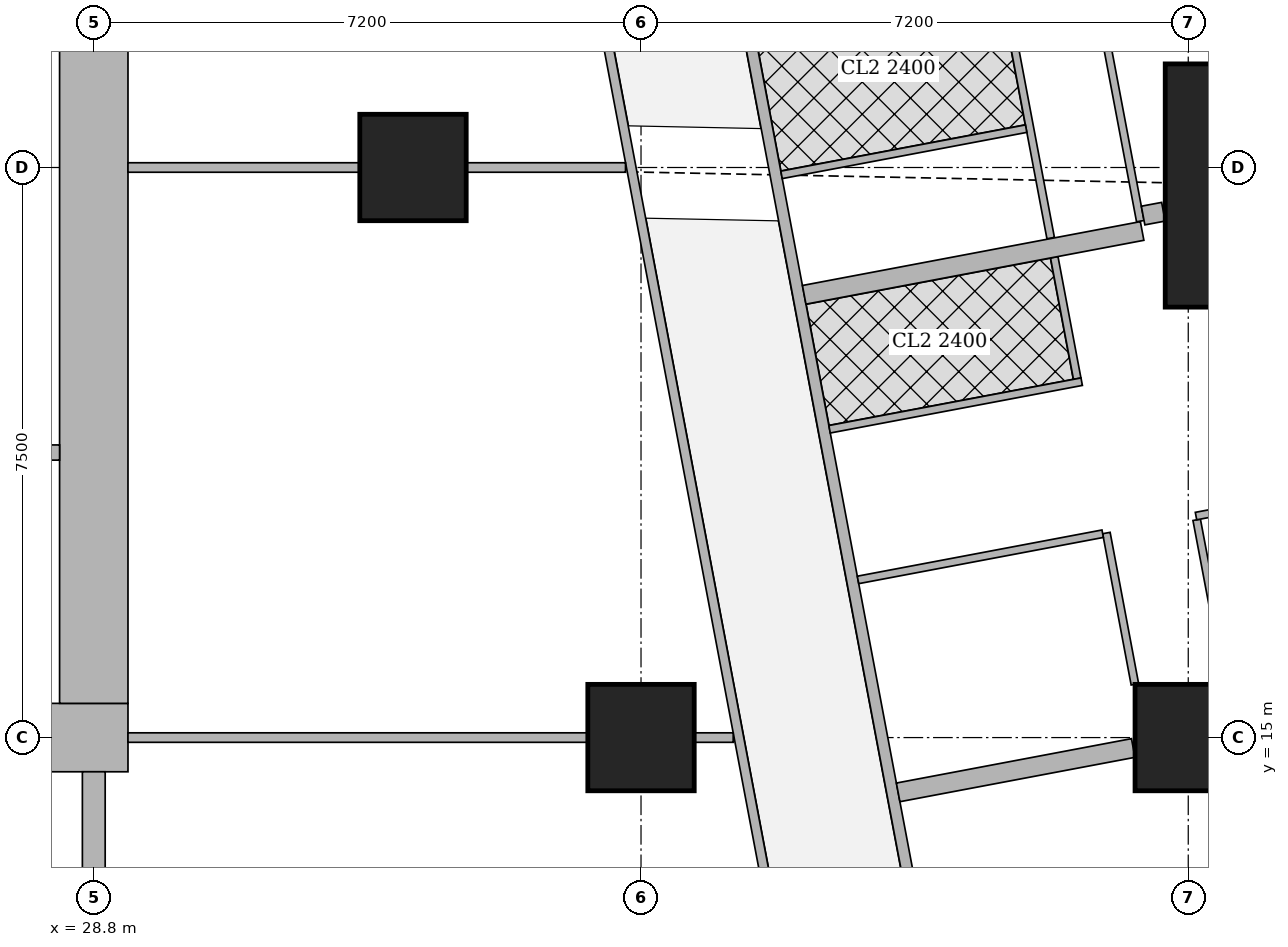
"""IFC4 building model, lengths in metres.
Left out: names, types, materials, properties, quantities, classifications, styles, units other than length and angle.
Written with IfcOpenShell. Run it as: python <this file> out.ifc"""

import sys

from ifc_helpers import new_model, si_unit, direction, frame, frame_2d, origin, origin_2d, place, context, subcontext, project, spatial, rectangle, extrude, element, fill, save


model = new_model("IFC4")
c1 = context("Model", 3, precision=1e-05, world=origin(), true_north=direction((0.0, 1.0)))
c2 = subcontext(c1, "Body", "Model", "MODEL_VIEW")
j1 = project(units=[si_unit("LENGTHUNIT", "METRE"), si_unit("PLANEANGLEUNIT", "RADIAN")], contexts=[c1])
p1 = place(None, origin())
s1 = spatial("IfcSite", under=j1, at=p1, CompositionType="ELEMENT")
p2 = place(p1, origin())
s2 = spatial("IfcBuilding", under=s1, at=p2, CompositionType="ELEMENT")
p3 = place(p2, frame((0.0, 0.0, 216.2)))
s3 = spatial("IfcBuildingStorey", under=s2, at=p3, CompositionType="ELEMENT", Elevation=216.2)
for number, where, z_axis, x_axis in (
    (1, (36.0, 15.0, 0.0), (0.0, 0.0, 1.0), (1.0, 0.0, 0.0)),
    (2, (43.2, 15.0, 0.0), (0.0, 0.0, 1.0), (1.0, 0.0, 0.0)),
    (3, (33.0, 22.5, 0.0), (0.0, 0.0, 1.0), (1.0, 0.0, 0.0)),
):
    element("IfcColumn", number, at=place(p3, frame(where, z_axis=z_axis, x_axis=x_axis)), inside=s3, PredefinedType="COLUMN", context=c2, shape_type="SweptSolid", body=[
        extrude(rectangle(XDim=1.4, YDim=1.4, at=origin_2d()), origin(), (0.0, 0.0, 1.0), 3.75),
    ])
p4 = place(p3, frame((44.697, 22.263, 0.0), z_axis=(0.0, 0.0, 1.0), x_axis=(1.0, 0.0, 0.0)))
e4 = element("IfcColumn", 4, at=p4, inside=s3, PredefinedType="COLUMN", context=c2, shape_type="SweptSolid", body=[
    extrude(rectangle(XDim=3.6, YDim=3.2, at=origin_2d()), origin(), (0.0, 0.0, 1.0), 3.75),
])
p5 = place(p3, frame((13.95, 15.0, 0.0), z_axis=(0.0, 0.0, 1.0), x_axis=(1.0, 0.0, 0.0)))
e5 = element("IfcWall", 5, at=p5, inside=s3, PredefinedType="SHEAR", context=c2, shape_type="SweptSolid", body=[
    extrude(rectangle(XDim=15.3, YDim=0.9, at=frame_2d((7.65, 0.0))), origin(), (0.0, 0.0, 1.0), 3.75),
])
p6 = place(p5, frame((4.45, 0.0, 0.0)))
e6 = element("IfcOpeningElement", 6, at=p6, cuts=e5, PredefinedType="OPENING", context=c2, shape_type="SweptSolid", body=[
    extrude(rectangle(XDim=1.8, YDim=2.1, at=frame_2d((0.9, 1.05))), frame((0.0, 0.46, 0.0), z_axis=(0.0, -1.0, 0.0), x_axis=(1.0, 0.0, 0.0)), (0.0, 0.0, 1.0), 0.92),
])
p7 = place(p5, frame((10.7, 0.0, 0.0)))
e7 = element("IfcOpeningElement", 7, at=p7, cuts=e5, PredefinedType="OPENING", context=c2, shape_type="SweptSolid", body=[
    extrude(rectangle(XDim=1.1, YDim=2.1, at=frame_2d((0.55, 1.05))), frame((0.0, 0.46, 0.0), z_axis=(0.0, -1.0, 0.0), x_axis=(1.0, 0.0, 0.0)), (0.0, 0.0, 1.0), 0.92),
])
p8 = place(p3, frame((28.8, 15.45, 0.0), z_axis=(0.0, 0.0, 1.0), x_axis=(0.0, 1.0, 0.0)))
e8 = element("IfcWall", 8, at=p8, inside=s3, PredefinedType="SHEAR", context=c2, shape_type="SweptSolid", body=[
    extrude(rectangle(XDim=14.1, YDim=0.9, at=frame_2d((7.05, 0.0))), origin(), (0.0, 0.0, 1.0), 3.75),
])
p9 = place(p3, frame((28.8, 10.35, 0.0), z_axis=(0.0, 0.0, 1.0), x_axis=(0.0, 1.0, 0.0)))
e9 = element("IfcWall", 9, at=p9, inside=s3, PredefinedType="SHEAR", context=c2, shape_type="SweptSolid", body=[
    extrude(rectangle(XDim=4.2, YDim=0.3, at=frame_2d((2.1, 0.0))), origin(), (0.0, 0.0, 1.0), 3.75),
])
p10 = place(p3, frame((50.653, 2.703, 0.0), z_axis=(0.0, 0.0, 1.0), x_axis=(-0.185612026696, 0.982623109613, 0.0)))
e10 = element("IfcWall", 10, at=p10, inside=s3, PredefinedType="SOLIDWALL", context=c2, shape_type="SweptSolid", body=[
    extrude(rectangle(XDim=41.393, YDim=0.2, at=frame_2d((20.697, 0.0))), origin(), (0.0, 0.0, 1.0), 3.5),
])
p11 = place(p10, frame((1.633, 0.0, 0.9)))
e11 = element("IfcOpeningElement", 11, at=p11, cuts=e10, PredefinedType="OPENING", context=c2, shape_type="SweptSolid", body=[
    extrude(rectangle(XDim=1.8, YDim=1.5, at=frame_2d((0.9, 0.75))), frame((0.0, 0.11, 0.0), z_axis=(0.0, -1.0, 0.0), x_axis=(1.0, 0.0, 0.0)), (0.0, 0.0, 1.0), 0.22),
])
p12 = place(p10, frame((6.032, 0.0, 0.9)))
e12 = element("IfcOpeningElement", 12, at=p12, cuts=e10, PredefinedType="OPENING", context=c2, shape_type="SweptSolid", body=[
    extrude(rectangle(XDim=1.8, YDim=1.5, at=frame_2d((0.9, 0.75))), frame((0.0, 0.11, 0.0), z_axis=(0.0, -1.0, 0.0), x_axis=(1.0, 0.0, 0.0)), (0.0, 0.0, 1.0), 0.22),
])
p13 = place(p10, frame((9.848, 0.0, 0.9)))
e13 = element("IfcOpeningElement", 13, at=p13, cuts=e10, PredefinedType="OPENING", context=c2, shape_type="SweptSolid", body=[
    extrude(rectangle(XDim=1.8, YDim=1.5, at=frame_2d((0.9, 0.75))), frame((0.0, 0.11, 0.0), z_axis=(0.0, -1.0, 0.0), x_axis=(1.0, 0.0, 0.0)), (0.0, 0.0, 1.0), 0.22),
])
p14 = place(p10, frame((13.664, 0.0, 0.9)))
e14 = element("IfcOpeningElement", 14, at=p14, cuts=e10, PredefinedType="OPENING", context=c2, shape_type="SweptSolid", body=[
    extrude(rectangle(XDim=1.8, YDim=1.5, at=frame_2d((0.9, 0.75))), frame((0.0, 0.11, 0.0), z_axis=(0.0, -1.0, 0.0), x_axis=(1.0, 0.0, 0.0)), (0.0, 0.0, 1.0), 0.22),
])
p15 = place(p10, frame((17.481, 0.0, 0.9)))
e15 = element("IfcOpeningElement", 15, at=p15, cuts=e10, PredefinedType="OPENING", context=c2, shape_type="SweptSolid", body=[
    extrude(rectangle(XDim=1.8, YDim=1.5, at=frame_2d((0.9, 0.75))), frame((0.0, 0.11, 0.0), z_axis=(0.0, -1.0, 0.0), x_axis=(1.0, 0.0, 0.0)), (0.0, 0.0, 1.0), 0.22),
])
p16 = place(p10, frame((21.297, 0.0, 0.9)))
e16 = element("IfcOpeningElement", 16, at=p16, cuts=e10, PredefinedType="OPENING", context=c2, shape_type="SweptSolid", body=[
    extrude(rectangle(XDim=1.8, YDim=1.5, at=frame_2d((0.9, 0.75))), frame((0.0, 0.11, 0.0), z_axis=(0.0, -1.0, 0.0), x_axis=(1.0, 0.0, 0.0)), (0.0, 0.0, 1.0), 0.22),
])
p17 = place(p10, frame((25.113, 0.0, 0.9)))
e17 = element("IfcOpeningElement", 17, at=p17, cuts=e10, PredefinedType="OPENING", context=c2, shape_type="SweptSolid", body=[
    extrude(rectangle(XDim=1.8, YDim=1.5, at=frame_2d((0.9, 0.75))), frame((0.0, 0.11, 0.0), z_axis=(0.0, -1.0, 0.0), x_axis=(1.0, 0.0, 0.0)), (0.0, 0.0, 1.0), 0.22),
])
p18 = place(p10, frame((28.93, 0.0, 0.9)))
e18 = element("IfcOpeningElement", 18, at=p18, cuts=e10, PredefinedType="OPENING", context=c2, shape_type="SweptSolid", body=[
    extrude(rectangle(XDim=1.8, YDim=1.5, at=frame_2d((0.9, 0.75))), frame((0.0, 0.11, 0.0), z_axis=(0.0, -1.0, 0.0), x_axis=(1.0, 0.0, 0.0)), (0.0, 0.0, 1.0), 0.22),
])
p19 = place(p10, frame((32.746, 0.0, 0.9)))
e19 = element("IfcOpeningElement", 19, at=p19, cuts=e10, PredefinedType="OPENING", context=c2, shape_type="SweptSolid", body=[
    extrude(rectangle(XDim=1.8, YDim=1.5, at=frame_2d((0.9, 0.75))), frame((0.0, 0.11, 0.0), z_axis=(0.0, -1.0, 0.0), x_axis=(1.0, 0.0, 0.0)), (0.0, 0.0, 1.0), 0.22),
])
p20 = place(p10, frame((36.481, 0.0, 0.9)))
e20 = element("IfcOpeningElement", 20, at=p20, cuts=e10, PredefinedType="OPENING", context=c2, shape_type="SweptSolid", body=[
    extrude(rectangle(XDim=1.8, YDim=1.5, at=frame_2d((0.9, 0.75))), frame((0.0, 0.11, 0.0), z_axis=(0.0, -1.0, 0.0), x_axis=(1.0, 0.0, 0.0)), (0.0, 0.0, 1.0), 0.22),
])
p21 = place(p3, frame((33.933, 42.73, 0.0), z_axis=(0.0, 0.0, 1.0), x_axis=(0.185595417643, -0.982626246825, 0.0)))
e21 = element("IfcWall", 21, at=p21, inside=s3, PredefinedType="SOLIDWALL", context=c2, shape_type="SweptSolid", body=[
    extrude(rectangle(XDim=41.051, YDim=0.15, at=frame_2d((20.525, 0.0))), origin(), (0.0, 0.0, 1.0), 2.5),
])
p22 = place(p21, frame((12.266, 0.0, 0.0)))
e22 = element("IfcOpeningElement", 22, at=p22, cuts=e21, PredefinedType="OPENING", context=c2, shape_type="SweptSolid", body=[
    extrude(rectangle(XDim=1.0, YDim=2.1, at=frame_2d((0.5, 1.05))), frame((0.0, 0.085, 0.0), z_axis=(0.0, -1.0, 0.0), x_axis=(1.0, 0.0, 0.0)), (0.0, 0.0, 1.0), 0.17),
])
p23 = place(p21, frame((16.082, 0.0, 0.0)))
e23 = element("IfcOpeningElement", 23, at=p23, cuts=e21, PredefinedType="OPENING", context=c2, shape_type="SweptSolid", body=[
    extrude(rectangle(XDim=1.0, YDim=2.1, at=frame_2d((0.5, 1.05))), frame((0.0, 0.085, 0.0), z_axis=(0.0, -1.0, 0.0), x_axis=(1.0, 0.0, 0.0)), (0.0, 0.0, 1.0), 0.17),
])
p24 = place(p21, frame((24.369, 0.0, 0.0)))
e24 = element("IfcOpeningElement", 24, at=p24, cuts=e21, PredefinedType="OPENING", context=c2, shape_type="SweptSolid", body=[
    extrude(rectangle(XDim=1.0, YDim=2.1, at=frame_2d((0.5, 1.05))), frame((0.0, 0.085, 0.0), z_axis=(0.0, -1.0, 0.0), x_axis=(1.0, 0.0, 0.0)), (0.0, 0.0, 1.0), 0.17),
])
p25 = place(p21, frame((30.862, 0.0, 0.0)))
e25 = element("IfcOpeningElement", 25, at=p25, cuts=e21, PredefinedType="OPENING", context=c2, shape_type="SweptSolid", body=[
    extrude(rectangle(XDim=1.0, YDim=2.1, at=frame_2d((0.5, 1.05))), frame((0.0, 0.085, 0.0), z_axis=(0.0, -1.0, 0.0), x_axis=(1.0, 0.0, 0.0)), (0.0, 0.0, 1.0), 0.17),
])
p26 = place(p3, frame((41.894, 25.366, 0.0), z_axis=(0.0, 0.0, 1.0), x_axis=(0.185695396387, -0.98260735788, 0.0)))
e26 = element("IfcWall", 26, at=p26, inside=s3, PredefinedType="PARTITIONING", context=c2, shape_type="SweptSolid", body=[
    extrude(rectangle(XDim=3.635, YDim=0.1, at=frame_2d((1.818, 0.0))), origin(), (0.0, 0.0, 1.0), 2.5),
])
p27 = place(p26, frame((0.151, 0.0, 0.0)))
e27 = element("IfcOpeningElement", 27, at=p27, cuts=e26, PredefinedType="OPENING", context=c2, shape_type="SweptSolid", body=[
    extrude(rectangle(XDim=0.9, YDim=2.1, at=frame_2d((0.45, 1.05))), frame((0.0, 0.06, 0.0), z_axis=(0.0, -1.0, 0.0), x_axis=(1.0, 0.0, 0.0)), (0.0, 0.0, 1.0), 0.12),
])
p28 = place(p3, frame((40.706, 25.192, 0.0), z_axis=(0.0, 0.0, 1.0), x_axis=(0.185580474845, -0.982629069057, 0.0)))
e28 = element("IfcWall", 28, at=p28, inside=s3, PredefinedType="PARTITIONING", context=c2, shape_type="SweptSolid", body=[
    extrude(rectangle(XDim=3.685, YDim=0.1, at=frame_2d((1.842, 0.0))), origin(), (0.0, 0.0, 1.0), 2.5),
])
p29 = place(p28, frame((0.655, 0.0, 0.0)))
e29 = element("IfcOpeningElement", 29, at=p29, cuts=e28, PredefinedType="OPENING", context=c2, shape_type="SweptSolid", body=[
    extrude(rectangle(XDim=0.9, YDim=2.1, at=frame_2d((0.45, 1.05))), frame((0.0, 0.06, 0.0), z_axis=(0.0, -1.0, 0.0), x_axis=(1.0, 0.0, 0.0)), (0.0, 0.0, 1.0), 0.12),
])
p30 = place(p28, frame((2.563, 0.0, 0.0)))
e30 = element("IfcOpeningElement", 30, at=p30, cuts=e28, PredefinedType="OPENING", context=c2, shape_type="SweptSolid", body=[
    extrude(rectangle(XDim=0.9, YDim=2.1, at=frame_2d((0.45, 1.05))), frame((0.0, 0.06, 0.0), z_axis=(0.0, -1.0, 0.0), x_axis=(1.0, 0.0, 0.0)), (0.0, 0.0, 1.0), 0.12),
])
p31 = place(p3, frame((41.067, 23.011, 0.0), z_axis=(0.0, 0.0, 1.0), x_axis=(-0.982618057925, -0.185638768151, 0.0)))
e31 = element("IfcWall", 31, at=p31, inside=s3, PredefinedType="PARTITIONING", context=c2, shape_type="SweptSolid", body=[
    extrude(rectangle(XDim=3.275, YDim=0.1, at=frame_2d((1.637, 0.0))), origin(), (0.0, 0.0, 1.0), 2.5),
])
p32 = place(p3, frame((41.437, 21.319, 0.0), z_axis=(0.0, 0.0, 1.0), x_axis=(0.185793689589, -0.982588777113, 0.0)))
e32 = element("IfcWall", 32, at=p32, inside=s3, PredefinedType="PARTITIONING", context=c2, shape_type="SweptSolid", body=[
    extrude(rectangle(XDim=1.625, YDim=0.1, at=frame_2d((0.813, 0.0))), origin(), (0.0, 0.0, 1.0), 3.5),
])
p33 = place(p32, frame((0.325, 0.0, 0.0)))
e33 = element("IfcOpeningElement", 33, at=p33, cuts=e32, PredefinedType="OPENING", context=c2, shape_type="SweptSolid", body=[
    extrude(rectangle(XDim=0.9, YDim=2.1, at=frame_2d((0.45, 1.05))), frame((0.0, 0.06, 0.0), z_axis=(0.0, -1.0, 0.0), x_axis=(1.0, 0.0, 0.0)), (0.0, 0.0, 1.0), 0.12),
])
p34 = place(p3, frame((41.798, 19.682, 0.0), z_axis=(0.0, 0.0, 1.0), x_axis=(-0.982656183703, -0.185436848091, 0.0)))
e34 = element("IfcWall", 34, at=p34, inside=s3, PredefinedType="PARTITIONING", context=c2, shape_type="SweptSolid", body=[
    extrude(rectangle(XDim=3.376, YDim=0.1, at=frame_2d((1.688, 0.0))), origin(), (0.0, 0.0, 1.0), 3.5),
])
p35 = place(p3, frame((43.311, 17.865, 0.0), z_axis=(0.0, 0.0, 1.0), x_axis=(0.185572140257, -0.982630643101, 0.0)))
e35 = element("IfcWall", 35, at=p35, inside=s3, PredefinedType="PARTITIONING", context=c2, shape_type="SweptSolid", body=[
    extrude(rectangle(XDim=2.193, YDim=0.1, at=frame_2d((1.097, 0.0))), origin(), (0.0, 0.0, 1.0), 3.5),
])
p36 = place(p35, frame((0.15, 0.0, 0.0)))
e36 = element("IfcOpeningElement", 36, at=p36, cuts=e35, PredefinedType="OPENING", context=c2, shape_type="SweptSolid", body=[
    extrude(rectangle(XDim=0.9, YDim=2.1, at=frame_2d((0.45, 1.05))), frame((0.0, 0.06, 0.0), z_axis=(0.0, -1.0, 0.0), x_axis=(1.0, 0.0, 0.0)), (0.0, 0.0, 1.0), 0.12),
])
p37 = place(p3, frame((42.123, 17.691, 0.0), z_axis=(0.0, 0.0, 1.0), x_axis=(0.185183804812, -0.98270390171, 0.0)))
e37 = element("IfcWall", 37, at=p37, inside=s3, PredefinedType="PARTITIONING", context=c2, shape_type="SweptSolid", body=[
    extrude(rectangle(XDim=2.025, YDim=0.1, at=frame_2d((1.012, 0.0))), origin(), (0.0, 0.0, 1.0), 3.5),
])
p38 = place(p3, frame((47.527, 18.712, 0.0), z_axis=(0.0, 0.0, 1.0), x_axis=(-0.982633535512, -0.185556823879, 0.0)))
e38 = element("IfcWall", 38, at=p38, inside=s3, PredefinedType="PARTITIONING", context=c2, shape_type="SweptSolid", body=[
    extrude(rectangle(XDim=4.3, YDim=0.1, at=frame_2d((2.15, 0.0))), origin(), (0.0, 0.0, 1.0), 2.05),
])
p39 = place(p3, frame((42.074, 17.682, 0.0), z_axis=(0.0, 0.0, 1.0), x_axis=(-0.982630897129, -0.185570795135, 0.0)))
e39 = element("IfcWall", 39, at=p39, inside=s3, PredefinedType="PARTITIONING", context=c2, shape_type="SweptSolid", body=[
    extrude(rectangle(XDim=3.276, YDim=0.1, at=frame_2d((1.638, 0.0))), origin(), (0.0, 0.0, 1.0), 3.5),
])
p40 = place(p39, frame((1.201, 0.0, 0.0)))
e40 = element("IfcOpeningElement", 40, at=p40, cuts=e39, PredefinedType="OPENING", context=c2, shape_type="SweptSolid", body=[
    extrude(rectangle(XDim=0.9, YDim=2.1, at=frame_2d((0.45, 1.05))), frame((0.0, 0.06, 0.0), z_axis=(0.0, -1.0, 0.0), x_axis=(1.0, 0.0, 0.0)), (0.0, 0.0, 1.0), 0.12),
])
p41 = place(p3, frame((42.873, 21.918, 0.0), z_axis=(0.0, 0.0, 1.0), x_axis=(-0.982892522967, -0.184180043152, 0.0)))
e41 = element("IfcWall", 41, at=p41, inside=s3, PredefinedType="SOLIDWALL", context=c2, shape_type="SweptSolid", body=[
    extrude(rectangle(XDim=0.272, YDim=0.25, at=frame_2d((0.136, 0.0))), origin(), (0.0, 0.0, 1.0), 2.5),
])
p42 = place(p3, frame((42.593, 21.665, 0.0), z_axis=(0.0, 0.0, 1.0), x_axis=(-0.982612837616, -0.185666398014, 0.0)))
e42 = element("IfcWall", 42, at=p42, inside=s3, PredefinedType="SOLIDWALL", context=c2, shape_type="SweptSolid", body=[
    extrude(rectangle(XDim=4.525, YDim=0.25, at=frame_2d((2.262, 0.0))), origin(), (0.0, 0.0, 1.0), 2.5),
])
p43 = place(p3, frame((42.476, 14.863, 0.0), z_axis=(0.0, 0.0, 1.0), x_axis=(-0.982638716117, -0.185529387398, 0.0)))
e43 = element("IfcWall", 43, at=p43, inside=s3, PredefinedType="SOLIDWALL", context=c2, shape_type="SweptSolid", body=[
    extrude(rectangle(XDim=3.148, YDim=0.25, at=frame_2d((1.574, 0.0))), origin(), (0.0, 0.0, 1.0), 3.5),
])
p44 = place(p3, frame((38.202, 10.163, 0.0), z_axis=(0.0, 0.0, 1.0), x_axis=(-0.185610321132, 0.982623431783, 0.0)))
e44 = element("IfcWall", 44, at=p44, inside=s3, PredefinedType="PARTITIONING", context=c2, shape_type="SweptSolid", body=[
    extrude(rectangle(XDim=25.111, YDim=0.125, at=frame_2d((12.556, 0.0))), origin(), (0.0, 0.0, 1.0), 2.5),
])
p45 = place(p44, frame((0.708, 0.0, 0.0)))
e45 = element("IfcOpeningElement", 45, at=p45, cuts=e44, PredefinedType="OPENING", context=c2, shape_type="SweptSolid", body=[
    extrude(rectangle(XDim=1.0, YDim=2.1, at=frame_2d((0.5, 1.05))), frame((0.0, 0.073, 0.0), z_axis=(0.0, -1.0, 0.0), x_axis=(1.0, 0.0, 0.0)), (0.0, 0.0, 1.0), 0.145),
])
p46 = place(p44, frame((5.9, 0.0, 0.0)))
e46 = element("IfcOpeningElement", 46, at=p46, cuts=e44, PredefinedType="OPENING", context=c2, shape_type="SweptSolid", body=[
    extrude(rectangle(XDim=1.0, YDim=2.1, at=frame_2d((0.5, 1.05))), frame((0.0, 0.073, 0.0), z_axis=(0.0, -1.0, 0.0), x_axis=(1.0, 0.0, 0.0)), (0.0, 0.0, 1.0), 0.145),
])
p47 = place(p44, frame((13.378, 0.0, 0.0)))
e47 = element("IfcOpeningElement", 47, at=p47, cuts=e44, PredefinedType="OPENING", context=c2, shape_type="SweptSolid", body=[
    extrude(rectangle(XDim=1.0, YDim=2.1, at=frame_2d((0.5, 1.05))), frame((0.0, 0.073, 0.0), z_axis=(0.0, -1.0, 0.0), x_axis=(1.0, 0.0, 0.0)), (0.0, 0.0, 1.0), 0.145),
])
p48 = place(p44, frame((21.15, 0.0, 0.0)))
e48 = element("IfcOpeningElement", 48, at=p48, cuts=e44, PredefinedType="OPENING", context=c2, shape_type="SweptSolid", body=[
    extrude(rectangle(XDim=1.0, YDim=2.1, at=frame_2d((0.5, 1.05))), frame((0.0, 0.073, 0.0), z_axis=(0.0, -1.0, 0.0), x_axis=(1.0, 0.0, 0.0)), (0.0, 0.0, 1.0), 0.145),
])
p49 = place(p3, frame((29.25, 15.0, 0.0), z_axis=(0.0, 0.0, 1.0), x_axis=(1.0, 0.0, 0.0)))
e49 = element("IfcWall", 49, at=p49, inside=s3, PredefinedType="PARTITIONING", context=c2, shape_type="SweptSolid", body=[
    extrude(rectangle(XDim=6.049, YDim=0.125, at=frame_2d((3.024, 0.0))), origin(), (0.0, 0.0, 1.0), 3.5),
])
p50 = place(p3, frame((36.701, 15.0, 0.0), z_axis=(0.0, 0.0, 1.0), x_axis=(1.0, 0.0, 0.0)))
e50 = element("IfcWall", 50, at=p50, inside=s3, PredefinedType="PARTITIONING", context=c2, shape_type="SweptSolid", body=[
    extrude(rectangle(XDim=0.512, YDim=0.125, at=frame_2d((0.256, 0.0))), origin(), (0.0, 0.0, 1.0), 3.5),
])
p51 = place(p3, frame((29.25, 22.5, 0.0), z_axis=(0.0, 0.0, 1.0), x_axis=(1.0, 0.0, 0.0)))
e51 = element("IfcWall", 51, at=p51, inside=s3, PredefinedType="PARTITIONING", context=c2, shape_type="SweptSolid", body=[
    extrude(rectangle(XDim=3.049, YDim=0.125, at=frame_2d((1.524, 0.0))), origin(), (0.0, 0.0, 1.0), 3.5),
])
p52 = place(p3, frame((33.701, 22.5, 0.0), z_axis=(0.0, 0.0, 1.0), x_axis=(1.0, 0.0, 0.0)))
e52 = element("IfcWall", 52, at=p52, inside=s3, PredefinedType="PARTITIONING", context=c2, shape_type="SweptSolid", body=[
    extrude(rectangle(XDim=2.095, YDim=0.125, at=frame_2d((1.047, 0.0))), origin(), (0.0, 0.0, 1.0), 2.5),
])
p53 = place(p3, frame((27.4, 18.75, 0.0), z_axis=(0.0, 0.0, 1.0), x_axis=(1.0, 0.0, 0.0)))
e53 = element("IfcWall", 53, at=p53, inside=s3, PredefinedType="SOLIDWALL", context=c2, shape_type="SweptSolid", body=[
    extrude(rectangle(XDim=0.95, YDim=0.2, at=frame_2d((0.475, 0.0))), origin(), (0.0, 0.0, 1.0), 3.5),
])
p54 = place(p29, origin())
e54 = element("IfcDoor", 54, at=p54, inside=s3, OperationType="SINGLE_SWING_RIGHT", PredefinedType="DOOR", context=c2, shape_type="SweptSolid", body=[
    extrude(rectangle(XDim=0.9, YDim=2.1, at=frame_2d((0.45, 1.05))), frame((0.0, 0.025, 0.0), z_axis=(0.0, -1.0, 0.0), x_axis=(1.0, 0.0, 0.0)), (0.0, 0.0, 1.0), 0.05),
])
fill(e29, e54)
p55 = place(p30, origin())
e55 = element("IfcDoor", 55, at=p55, inside=s3, OperationType="SINGLE_SWING_LEFT", PredefinedType="DOOR", context=c2, shape_type="SweptSolid", body=[
    extrude(rectangle(XDim=0.9, YDim=2.1, at=frame_2d((0.45, 1.05))), frame((0.0, 0.025, 0.0), z_axis=(0.0, -1.0, 0.0), x_axis=(1.0, 0.0, 0.0)), (0.0, 0.0, 1.0), 0.05),
])
fill(e30, e55)
p56 = place(p33, origin())
e56 = element("IfcDoor", 56, at=p56, inside=s3, OperationType="SINGLE_SWING_RIGHT", PredefinedType="DOOR", context=c2, shape_type="SweptSolid", body=[
    extrude(rectangle(XDim=0.9, YDim=2.1, at=frame_2d((0.45, 1.05))), frame((0.0, 0.025, 0.0), z_axis=(0.0, -1.0, 0.0), x_axis=(1.0, 0.0, 0.0)), (0.0, 0.0, 1.0), 0.05),
])
fill(e33, e56)
p57 = place(p36, origin())
e57 = element("IfcDoor", 57, at=p57, inside=s3, OperationType="SINGLE_SWING_LEFT", PredefinedType="DOOR", context=c2, shape_type="SweptSolid", body=[
    extrude(rectangle(XDim=0.9, YDim=2.1, at=frame_2d((0.45, 1.05))), frame((0.0, 0.025, 0.0), z_axis=(0.0, -1.0, 0.0), x_axis=(1.0, 0.0, 0.0)), (0.0, 0.0, 1.0), 0.05),
])
fill(e36, e57)
p58 = place(p24, origin())
e58 = element("IfcDoor", 58, at=p58, inside=s3, OperationType="SINGLE_SWING_LEFT", PredefinedType="DOOR", context=c2, shape_type="SweptSolid", body=[
    extrude(rectangle(XDim=1.0, YDim=2.1, at=frame_2d((0.5, 1.05))), frame((0.0, 0.025, 0.0), z_axis=(0.0, -1.0, 0.0), x_axis=(1.0, 0.0, 0.0)), (0.0, 0.0, 1.0), 0.05),
])
fill(e24, e58)
p59 = place(p40, origin())
e59 = element("IfcDoor", 59, at=p59, inside=s3, OperationType="SINGLE_SWING_RIGHT", PredefinedType="DOOR", context=c2, shape_type="SweptSolid", body=[
    extrude(rectangle(XDim=0.9, YDim=2.1, at=frame_2d((0.45, 1.05))), frame((0.0, 0.025, 0.0), z_axis=(0.0, -1.0, 0.0), x_axis=(1.0, 0.0, 0.0)), (0.0, 0.0, 1.0), 0.05),
])
fill(e40, e59)
p60 = place(p46, origin())
e60 = element("IfcDoor", 60, at=p60, inside=s3, OperationType="SINGLE_SWING_LEFT", PredefinedType="DOOR", context=c2, shape_type="SweptSolid", body=[
    extrude(rectangle(XDim=1.0, YDim=2.1, at=frame_2d((0.5, 1.05))), frame((0.0, 0.025, 0.0), z_axis=(0.0, -1.0, 0.0), x_axis=(1.0, 0.0, 0.0)), (0.0, 0.0, 1.0), 0.05),
])
fill(e46, e60)
p61 = place(p47, origin())
e61 = element("IfcDoor", 61, at=p61, inside=s3, OperationType="SINGLE_SWING_LEFT", PredefinedType="DOOR", context=c2, shape_type="SweptSolid", body=[
    extrude(rectangle(XDim=1.0, YDim=2.1, at=frame_2d((0.5, 1.05))), frame((0.0, 0.025, 0.0), z_axis=(0.0, -1.0, 0.0), x_axis=(1.0, 0.0, 0.0)), (0.0, 0.0, 1.0), 0.05),
])
fill(e47, e61)
save(model, sys.argv[1])
